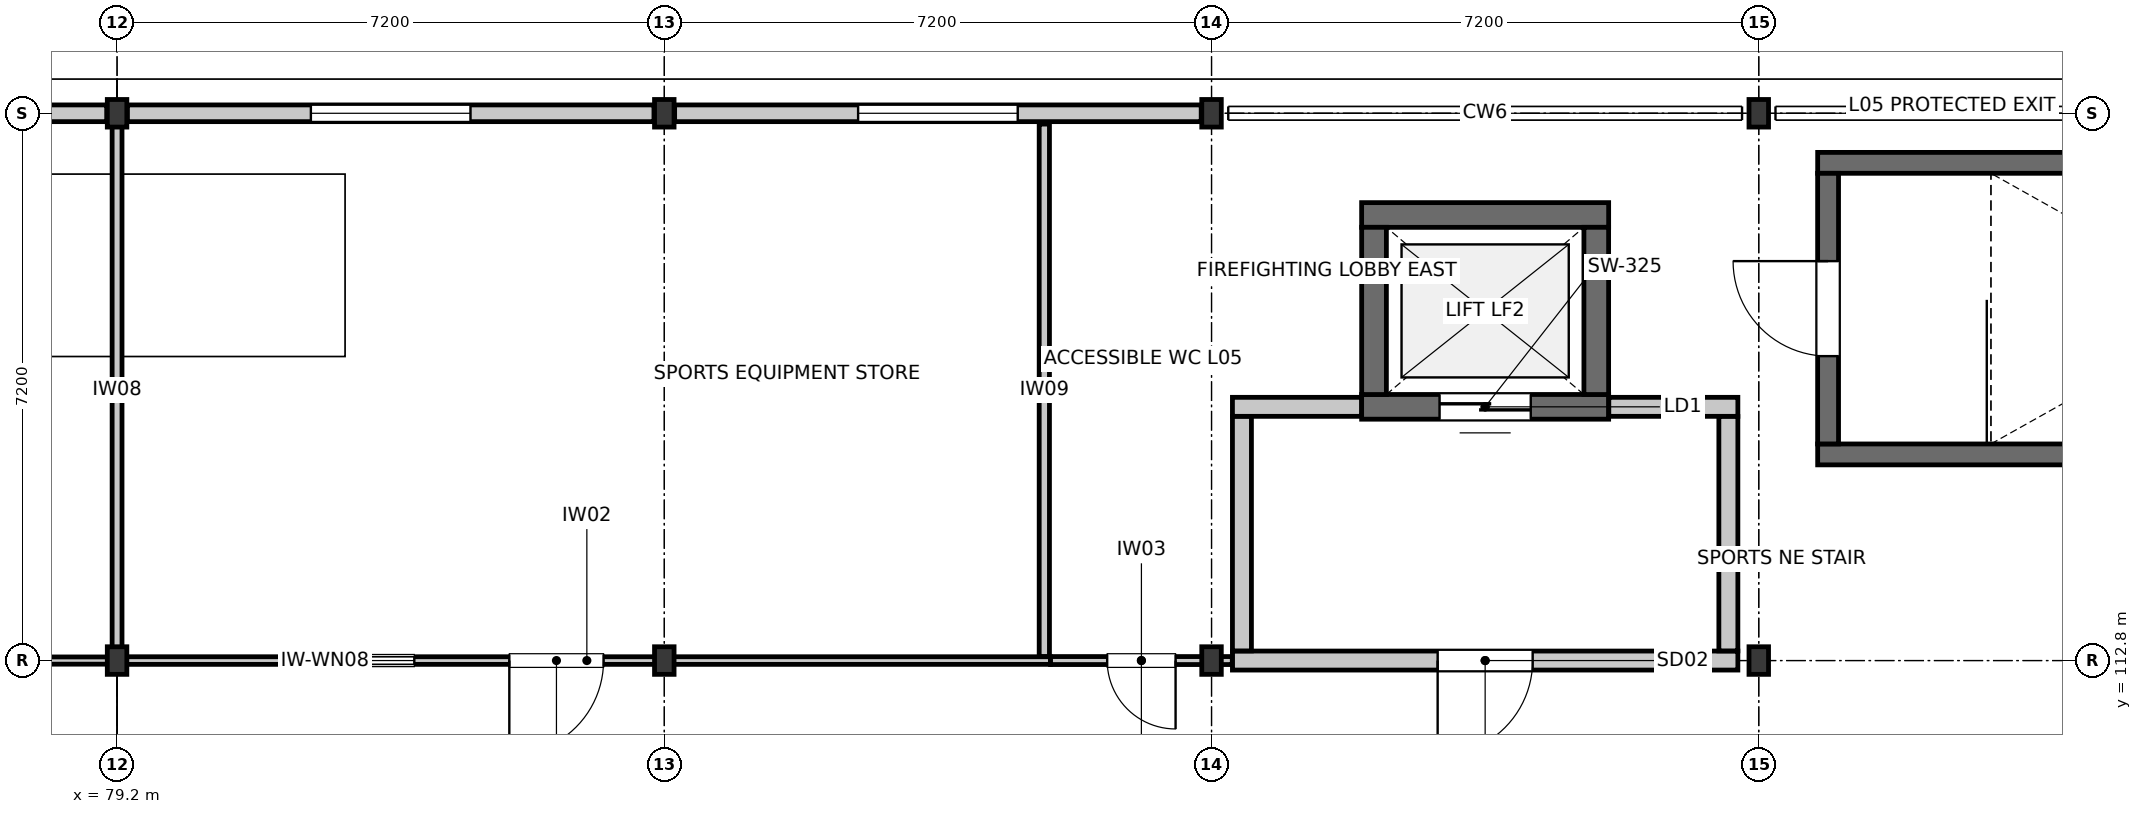
"""IFC4 building model, lengths in metres.
Left out: names, types, materials, properties, quantities, classifications, styles, units other than length and angle.
Written with IfcOpenShell. Run it as: python <this file> out.ifc"""

import sys

from ifc_helpers import new_model, si_unit, direction, frame, frame_2d, origin, origin_2d, place, context, subcontext, project, spatial, rectangle, i_section, extrude, element, fill, save


model = new_model("IFC4")
c1 = context("Model", 3, precision=1e-05, world=origin(), true_north=direction((0.0, 1.0)))
c2 = subcontext(c1, "Body", "Model", "MODEL_VIEW")
j1 = project(units=[si_unit("LENGTHUNIT", "METRE"), si_unit("PLANEANGLEUNIT", "RADIAN")], contexts=[c1])
p1 = place(None, origin())
s1 = spatial("IfcSite", under=j1, at=p1, CompositionType="ELEMENT")
p2 = place(p1, origin())
s2 = spatial("IfcBuilding", under=s1, at=p2, CompositionType="ELEMENT")
p3 = place(p2, frame((0.0, 0.0, 21.0)))
s3 = spatial("IfcBuildingStorey", under=s2, at=p3, CompositionType="ELEMENT", Elevation=21.0)
p4 = place(p3, frame((79.2, 112.8, 0.0), z_axis=(0.0, 0.0, 1.0), x_axis=(1.0, 0.0, 0.0)))
e1 = element("IfcColumn", 1, at=p4, inside=s3, PredefinedType="COLUMN", context=c2, shape_type="SweptSolid", body=[
    extrude(i_section(OverallWidth=0.257, OverallDepth=0.363, WebThickness=0.013, FlangeThickness=0.022, FilletRadius=0.015, at=origin_2d()), origin(), (0.0, 0.0, 1.0), 3.3),
])
p5 = place(p3, frame((79.2, 120.0, 0.0), z_axis=(0.0, 0.0, 1.0), x_axis=(1.0, 0.0, 0.0)))
e2 = element("IfcColumn", 2, at=p5, inside=s3, PredefinedType="COLUMN", context=c2, shape_type="SweptSolid", body=[
    extrude(i_section(OverallWidth=0.257, OverallDepth=0.363, WebThickness=0.013, FlangeThickness=0.022, FilletRadius=0.015, at=origin_2d()), origin(), (0.0, 0.0, 1.0), 4.8),
])
p6 = place(p3, frame((86.4, 112.8, 0.0), z_axis=(0.0, 0.0, 1.0), x_axis=(1.0, 0.0, 0.0)))
e3 = element("IfcColumn", 3, at=p6, inside=s3, PredefinedType="COLUMN", context=c2, shape_type="SweptSolid", body=[
    extrude(i_section(OverallWidth=0.257, OverallDepth=0.363, WebThickness=0.013, FlangeThickness=0.022, FilletRadius=0.015, at=origin_2d()), origin(), (0.0, 0.0, 1.0), 3.3),
])
p7 = place(p3, frame((86.4, 120.0, 0.0), z_axis=(0.0, 0.0, 1.0), x_axis=(1.0, 0.0, 0.0)))
e4 = element("IfcColumn", 4, at=p7, inside=s3, PredefinedType="COLUMN", context=c2, shape_type="SweptSolid", body=[
    extrude(i_section(OverallWidth=0.257, OverallDepth=0.363, WebThickness=0.013, FlangeThickness=0.022, FilletRadius=0.015, at=origin_2d()), origin(), (0.0, 0.0, 1.0), 4.8),
])
p8 = place(p3, frame((93.6, 112.8, 0.0), z_axis=(0.0, 0.0, 1.0), x_axis=(1.0, 0.0, 0.0)))
e5 = element("IfcColumn", 5, at=p8, inside=s3, PredefinedType="COLUMN", context=c2, shape_type="SweptSolid", body=[
    extrude(i_section(OverallWidth=0.257, OverallDepth=0.363, WebThickness=0.013, FlangeThickness=0.022, FilletRadius=0.015, at=origin_2d()), origin(), (0.0, 0.0, 1.0), 3.3),
])
p9 = place(p3, frame((93.6, 120.0, 0.0), z_axis=(0.0, 0.0, 1.0), x_axis=(1.0, 0.0, 0.0)))
e6 = element("IfcColumn", 6, at=p9, inside=s3, PredefinedType="COLUMN", context=c2, shape_type="SweptSolid", body=[
    extrude(i_section(OverallWidth=0.257, OverallDepth=0.363, WebThickness=0.013, FlangeThickness=0.022, FilletRadius=0.015, at=origin_2d()), origin(), (0.0, 0.0, 1.0), 4.8),
])
p10 = place(p3, frame((100.8, 112.8, 0.0), z_axis=(0.0, 0.0, 1.0), x_axis=(1.0, 0.0, 0.0)))
e7 = element("IfcColumn", 7, at=p10, inside=s3, PredefinedType="COLUMN", context=c2, shape_type="SweptSolid", body=[
    extrude(i_section(OverallWidth=0.257, OverallDepth=0.363, WebThickness=0.013, FlangeThickness=0.022, FilletRadius=0.015, at=origin_2d()), origin(), (0.0, 0.0, 1.0), 3.3),
])
p11 = place(p3, frame((100.8, 120.0, 0.0), z_axis=(0.0, 0.0, 1.0), x_axis=(1.0, 0.0, 0.0)))
e8 = element("IfcColumn", 8, at=p11, inside=s3, PredefinedType="COLUMN", context=c2, shape_type="SweptSolid", body=[
    extrude(i_section(OverallWidth=0.257, OverallDepth=0.363, WebThickness=0.013, FlangeThickness=0.022, FilletRadius=0.015, at=origin_2d()), origin(), (0.0, 0.0, 1.0), 4.8),
])
p12 = place(p3, frame((72.136, 120.0, 0.0), z_axis=(0.0, 0.0, 1.0), x_axis=(1.0, 0.0, 0.0)))
e9 = element("IfcWall", 9, at=p12, inside=s3, PredefinedType="STANDARD", context=c2, shape_type="SweptSolid", body=[
    extrude(rectangle(XDim=6.928, YDim=0.22, at=frame_2d((3.464, 0.0))), origin(), (0.0, 0.0, 1.0), 4.3),
])
p13 = place(p12, frame((2.414, 0.0, 1.2)))
e10 = element("IfcOpeningElement", 10, at=p13, cuts=e9, PredefinedType="OPENING", context=c2, shape_type="SweptSolid", body=[
    extrude(rectangle(XDim=2.1, YDim=1.5, at=frame_2d((1.05, 0.75))), frame((0.0, 0.12, 0.0), z_axis=(0.0, -1.0, 0.0), x_axis=(1.0, 0.0, 0.0)), (0.0, 0.0, 1.0), 0.24),
])
p14 = place(p3, frame((79.336, 120.0, 0.0), z_axis=(0.0, 0.0, 1.0), x_axis=(1.0, 0.0, 0.0)))
e11 = element("IfcWall", 11, at=p14, inside=s3, PredefinedType="STANDARD", context=c2, shape_type="SweptSolid", body=[
    extrude(rectangle(XDim=6.928, YDim=0.22, at=frame_2d((3.464, 0.0))), origin(), (0.0, 0.0, 1.0), 4.3),
])
p15 = place(p14, frame((2.414, 0.0, 1.2)))
e12 = element("IfcOpeningElement", 12, at=p15, cuts=e11, PredefinedType="OPENING", context=c2, shape_type="SweptSolid", body=[
    extrude(rectangle(XDim=2.1, YDim=1.5, at=frame_2d((1.05, 0.75))), frame((0.0, 0.12, 0.0), z_axis=(0.0, -1.0, 0.0), x_axis=(1.0, 0.0, 0.0)), (0.0, 0.0, 1.0), 0.24),
])
p16 = place(p3, frame((86.536, 120.0, 0.0), z_axis=(0.0, 0.0, 1.0), x_axis=(1.0, 0.0, 0.0)))
e13 = element("IfcWall", 13, at=p16, inside=s3, PredefinedType="STANDARD", context=c2, shape_type="SweptSolid", body=[
    extrude(rectangle(XDim=6.928, YDim=0.22, at=frame_2d((3.464, 0.0))), origin(), (0.0, 0.0, 1.0), 4.3),
])
p17 = place(p16, frame((2.414, 0.0, 1.2)))
e14 = element("IfcOpeningElement", 14, at=p17, cuts=e13, PredefinedType="OPENING", context=c2, shape_type="SweptSolid", body=[
    extrude(rectangle(XDim=2.1, YDim=1.5, at=frame_2d((1.05, 0.75))), frame((0.0, 0.12, 0.0), z_axis=(0.0, -1.0, 0.0), x_axis=(1.0, 0.0, 0.0)), (0.0, 0.0, 1.0), 0.24),
])
for number, where, z_axis, x_axis in (
    (15, (110.475, 115.512, 0.0), (0.0, 0.0, 1.0), (-1.0, 0.0, 0.0)),
    (16, (101.575, 119.348, 0.0), (0.0, 0.0, 1.0), (1.0, 0.0, 0.0)),
):
    element("IfcWall", number, at=place(p3, frame(where, z_axis=z_axis, x_axis=x_axis)), inside=s3, PredefinedType="SOLIDWALL", context=c2, shape_type="SweptSolid", body=[
        extrude(rectangle(XDim=8.9, YDim=0.275, at=frame_2d((4.45, 0.0))), origin(), (0.0, 0.0, 1.0), 2.6),
    ])
p18 = place(p3, frame((101.712, 115.65, 0.0), z_axis=(0.0, 0.0, 1.0), x_axis=(0.0, 1.0, 0.0)))
e17 = element("IfcWall", 17, at=p18, inside=s3, PredefinedType="SOLIDWALL", context=c2, shape_type="SweptSolid", body=[
    extrude(rectangle(XDim=3.56, YDim=0.275, at=frame_2d((1.78, 0.0))), origin(), (0.0, 0.0, 1.0), 2.6),
])
p19 = place(p18, frame((1.155, 0.0, 0.0)))
e18 = element("IfcOpeningElement", 18, at=p19, cuts=e17, PredefinedType="OPENING", context=c2, shape_type="SweptSolid", body=[
    extrude(rectangle(XDim=1.25, YDim=2.2, at=frame_2d((0.625, 1.1))), frame((0.0, 0.147, 0.0), z_axis=(0.0, -1.0, 0.0), x_axis=(1.0, 0.0, 0.0)), (0.0, 0.0, 1.0), 0.295),
])
p20 = place(p3, frame((98.825, 116.138, 0.0), z_axis=(0.0, 0.0, 1.0), x_axis=(-1.0, 0.0, 0.0)))
e19 = element("IfcWall", 19, at=p20, inside=s3, PredefinedType="SHEAR", context=c2, shape_type="SweptSolid", body=[
    extrude(rectangle(XDim=3.25, YDim=0.325, at=frame_2d((1.625, 0.0))), origin(), (0.0, 0.0, 1.0), 2.6),
])
p21 = place(p20, frame((1.025, 0.0, 0.0)))
e20 = element("IfcOpeningElement", 20, at=p21, cuts=e19, PredefinedType="OPENING", context=c2, shape_type="SweptSolid", body=[
    extrude(rectangle(XDim=1.2, YDim=2.2, at=frame_2d((0.6, 1.1))), frame((0.0, 0.172, 0.0), z_axis=(0.0, -1.0, 0.0), x_axis=(1.0, 0.0, 0.0)), (0.0, 0.0, 1.0), 0.345),
])
p22 = place(p3, frame((95.575, 118.662, 0.0), z_axis=(0.0, 0.0, 1.0), x_axis=(1.0, 0.0, 0.0)))
e21 = element("IfcWall", 21, at=p22, inside=s3, PredefinedType="SHEAR", context=c2, shape_type="SweptSolid", body=[
    extrude(rectangle(XDim=3.25, YDim=0.325, at=frame_2d((1.625, 0.0))), origin(), (0.0, 0.0, 1.0), 2.6),
])
for number, where, z_axis, x_axis in (
    (22, (95.738, 116.3, 0.0), (0.0, 0.0, 1.0), (0.0, 1.0, 0.0)),
    (23, (98.662, 118.5, 0.0), (0.0, 0.0, 1.0), (0.0, -1.0, 0.0)),
):
    element("IfcWall", number, at=place(p3, frame(where, z_axis=z_axis, x_axis=x_axis)), inside=s3, PredefinedType="SHEAR", context=c2, shape_type="SweptSolid", body=[
        extrude(rectangle(XDim=2.2, YDim=0.325, at=frame_2d((1.1, 0.0))), origin(), (0.0, 0.0, 1.0), 2.6),
    ])
p23 = place(p3, frame((100.525, 112.8, 0.0), z_axis=(0.0, 0.0, 1.0), x_axis=(-1.0, 0.0, 0.0)))
e24 = element("IfcWall", 24, at=p23, inside=s3, PredefinedType="PARTITIONING", context=c2, shape_type="SweptSolid", body=[
    extrude(rectangle(XDim=6.65, YDim=0.25, at=frame_2d((3.325, 0.0))), origin(), (0.0, 0.0, 1.0), 2.5),
])
p24 = place(p23, frame((2.7, 0.0, 0.0)))
e25 = element("IfcOpeningElement", 25, at=p24, cuts=e24, PredefinedType="OPENING", context=c2, shape_type="SweptSolid", body=[
    extrude(rectangle(XDim=1.25, YDim=2.2, at=frame_2d((0.625, 1.1))), frame((0.0, 0.135, 0.0), z_axis=(0.0, -1.0, 0.0), x_axis=(1.0, 0.0, 0.0)), (0.0, 0.0, 1.0), 0.27),
])
for number, where, z_axis, x_axis in (
    (26, (93.875, 116.138, 0.0), (0.0, 0.0, 1.0), (1.0, 0.0, 0.0)),
    (27, (98.827, 116.138, 0.0), (0.0, 0.0, 1.0), (1.0, 0.0, 0.0)),
):
    element("IfcWall", number, at=place(p3, frame(where, z_axis=z_axis, x_axis=x_axis)), inside=s3, PredefinedType="PARTITIONING", context=c2, shape_type="SweptSolid", body=[
        extrude(rectangle(XDim=1.698, YDim=0.25, at=frame_2d((0.849, 0.0))), origin(), (0.0, 0.0, 1.0), 2.5),
    ])
for number, where, z_axis, x_axis in (
    (28, (94.0, 112.927, 0.0), (0.0, 0.0, 1.0), (0.0, 1.0, 0.0)),
    (29, (100.4, 116.011, 0.0), (0.0, 0.0, 1.0), (0.0, -1.0, 0.0)),
):
    element("IfcWall", number, at=place(p3, frame(where, z_axis=z_axis, x_axis=x_axis)), inside=s3, PredefinedType="PARTITIONING", context=c2, shape_type="SweptSolid", body=[
        extrude(rectangle(XDim=3.084, YDim=0.25, at=frame_2d((1.542, 0.0))), origin(), (0.0, 0.0, 1.0), 2.5),
    ])
p25 = place(p3, frame((79.28, 112.8, 0.0), z_axis=(0.0, 0.0, 1.0), x_axis=(-1.0, 0.0, 0.0)))
e30 = element("IfcWall", 30, at=p25, inside=s3, PredefinedType="PARTITIONING", context=c2, shape_type="SweptSolid", body=[
    extrude(rectangle(XDim=7.198, YDim=0.095, at=frame_2d((3.599, 0.0))), origin(), (0.0, 0.0, 1.0), 2.5),
])
p26 = place(p25, frame((3.029, 0.0, 0.0)))
e31 = element("IfcOpeningElement", 31, at=p26, cuts=e30, PredefinedType="OPENING", context=c2, shape_type="SweptSolid", body=[
    extrude(rectangle(XDim=1.14, YDim=2.16, at=frame_2d((0.57, 1.08))), frame((0.0, 0.057, 0.0), z_axis=(0.0, -1.0, 0.0), x_axis=(1.0, 0.0, 0.0)), (0.0, 0.0, 1.0), 0.115),
])
p27 = place(p3, frame((91.48, 112.8, 0.0), z_axis=(0.0, 0.0, 1.0), x_axis=(-1.0, 0.0, 0.0)))
e32 = element("IfcWall", 32, at=p27, inside=s3, PredefinedType="PARTITIONING", context=c2, shape_type="SweptSolid", body=[
    extrude(rectangle(XDim=12.198, YDim=0.1, at=frame_2d((6.099, 0.0))), origin(), (0.0, 0.0, 1.0), 2.5),
])
p28 = place(p27, frame((5.879, 0.0, 0.0)))
e33 = element("IfcOpeningElement", 33, at=p28, cuts=e32, PredefinedType="OPENING", context=c2, shape_type="SweptSolid", body=[
    extrude(rectangle(XDim=1.24, YDim=2.16, at=frame_2d((0.62, 1.08))), frame((0.0, 0.06, 0.0), z_axis=(0.0, -1.0, 0.0), x_axis=(1.0, 0.0, 0.0)), (0.0, 0.0, 1.0), 0.12),
])
p29 = place(p27, frame((8.369, 0.0, 0.95)))
e34 = element("IfcOpeningElement", 34, at=p29, cuts=e32, PredefinedType="OPENING", context=c2, shape_type="SweptSolid", body=[
    extrude(rectangle(XDim=1.75, YDim=1.15, at=frame_2d((0.875, 0.575))), frame((0.0, 0.06, 0.0), z_axis=(0.0, -1.0, 0.0), x_axis=(1.0, 0.0, 0.0)), (0.0, 0.0, 1.0), 0.12),
])
p30 = place(p3, frame((93.873, 112.8, 0.0), z_axis=(0.0, 0.0, 1.0), x_axis=(-1.0, 0.0, 0.0)))
e35 = element("IfcWall", 35, at=p30, inside=s3, PredefinedType="PARTITIONING", context=c2, shape_type="SweptSolid", body=[
    extrude(rectangle(XDim=2.391, YDim=0.105, at=frame_2d((1.196, 0.0))), origin(), (0.0, 0.0, 1.0), 2.5),
])
p31 = place(p30, frame((0.746, 0.0, 0.0)))
e36 = element("IfcOpeningElement", 36, at=p31, cuts=e35, PredefinedType="OPENING", context=c2, shape_type="SweptSolid", body=[
    extrude(rectangle(XDim=0.9, YDim=2.1, at=frame_2d((0.45, 1.05))), frame((0.0, 0.062, 0.0), z_axis=(0.0, -1.0, 0.0), x_axis=(1.0, 0.0, 0.0)), (0.0, 0.0, 1.0), 0.125),
])
p32 = place(p3, frame((79.2, 119.858, 0.0), z_axis=(0.0, 0.0, 1.0), x_axis=(0.0, -1.0, 0.0)))
e37 = element("IfcWall", 37, at=p32, inside=s3, PredefinedType="PARTITIONING", context=c2, shape_type="SweptSolid", body=[
    extrude(rectangle(XDim=7.006, YDim=0.13, at=frame_2d((3.503, 0.0))), origin(), (0.0, 0.0, 1.0), 2.5),
])
p33 = place(p3, frame((91.4, 119.858, 0.0), z_axis=(0.0, 0.0, 1.0), x_axis=(0.0, -1.0, 0.0)))
e38 = element("IfcWall", 38, at=p33, inside=s3, PredefinedType="PARTITIONING", context=c2, shape_type="SweptSolid", body=[
    extrude(rectangle(XDim=7.004, YDim=0.135, at=frame_2d((3.502, 0.0))), origin(), (0.0, 0.0, 1.0), 2.5),
])
p34 = place(p15, origin())
e39 = element("IfcWindow", 39, at=p34, inside=s3, PartitioningType="SINGLE_PANEL", PredefinedType="WINDOW", context=c2, shape_type="SweptSolid", body=[
    extrude(rectangle(XDim=2.1, YDim=1.5, at=frame_2d((1.05, 0.75))), frame((0.0, 0.03, 0.0), z_axis=(0.0, -1.0, 0.0), x_axis=(1.0, 0.0, 0.0)), (0.0, 0.0, 1.0), 0.06),
])
fill(e12, e39)
p35 = place(p17, origin())
e40 = element("IfcWindow", 40, at=p35, inside=s3, PartitioningType="SINGLE_PANEL", PredefinedType="WINDOW", context=c2, shape_type="SweptSolid", body=[
    extrude(rectangle(XDim=2.1, YDim=1.5, at=frame_2d((1.05, 0.75))), frame((0.0, 0.03, 0.0), z_axis=(0.0, -1.0, 0.0), x_axis=(1.0, 0.0, 0.0)), (0.0, 0.0, 1.0), 0.06),
])
fill(e14, e40)
p36 = place(p19, origin())
e41 = element("IfcDoor", 41, at=p36, inside=s3, OperationType="SINGLE_SWING_RIGHT", PredefinedType="DOOR", context=c2, shape_type="SweptSolid", body=[
    extrude(rectangle(XDim=1.25, YDim=2.2, at=frame_2d((0.625, 1.1))), frame((0.0, 0.025, 0.0), z_axis=(0.0, -1.0, 0.0), x_axis=(1.0, 0.0, 0.0)), (0.0, 0.0, 1.0), 0.05),
])
fill(e18, e41)
p37 = place(p21, origin())
e42 = element("IfcDoor", 42, at=p37, inside=s3, OperationType="DOUBLE_DOOR_SLIDING", PredefinedType="DOOR", context=c2, shape_type="SweptSolid", body=[
    extrude(rectangle(XDim=1.2, YDim=2.2, at=frame_2d((0.6, 1.1))), frame((0.0, 0.025, 0.0), z_axis=(0.0, -1.0, 0.0), x_axis=(1.0, 0.0, 0.0)), (0.0, 0.0, 1.0), 0.05),
])
fill(e20, e42)
p38 = place(p24, origin())
e43 = element("IfcDoor", 43, at=p38, inside=s3, OperationType="SINGLE_SWING_RIGHT", PredefinedType="DOOR", context=c2, shape_type="SweptSolid", body=[
    extrude(rectangle(XDim=1.25, YDim=2.2, at=frame_2d((0.625, 1.1))), frame((0.0, 0.025, 0.0), z_axis=(0.0, -1.0, 0.0), x_axis=(1.0, 0.0, 0.0)), (0.0, 0.0, 1.0), 0.05),
])
fill(e25, e43)
p39 = place(p28, origin())
e44 = element("IfcDoor", 44, at=p39, inside=s3, OperationType="SINGLE_SWING_RIGHT", PredefinedType="DOOR", context=c2, shape_type="SweptSolid", body=[
    extrude(rectangle(XDim=1.24, YDim=2.16, at=frame_2d((0.62, 1.08))), frame((0.0, 0.025, 0.0), z_axis=(0.0, -1.0, 0.0), x_axis=(1.0, 0.0, 0.0)), (0.0, 0.0, 1.0), 0.05),
])
fill(e33, e44)
p40 = place(p29, origin())
e45 = element("IfcWindow", 45, at=p40, inside=s3, PartitioningType="SINGLE_PANEL", PredefinedType="WINDOW", context=c2, shape_type="SweptSolid", body=[
    extrude(rectangle(XDim=1.75, YDim=1.15, at=frame_2d((0.875, 0.575))), frame((0.0, 0.03, 0.0), z_axis=(0.0, -1.0, 0.0), x_axis=(1.0, 0.0, 0.0)), (0.0, 0.0, 1.0), 0.06),
])
fill(e34, e45)
p41 = place(p31, origin())
e46 = element("IfcDoor", 46, at=p41, inside=s3, OperationType="SINGLE_SWING_LEFT", PredefinedType="DOOR", context=c2, shape_type="SweptSolid", body=[
    extrude(rectangle(XDim=0.9, YDim=2.1, at=frame_2d((0.45, 1.05))), frame((0.0, 0.025, 0.0), z_axis=(0.0, -1.0, 0.0), x_axis=(1.0, 0.0, 0.0)), (0.0, 0.0, 1.0), 0.05),
])
fill(e36, e46)
save(model, sys.argv[1])
